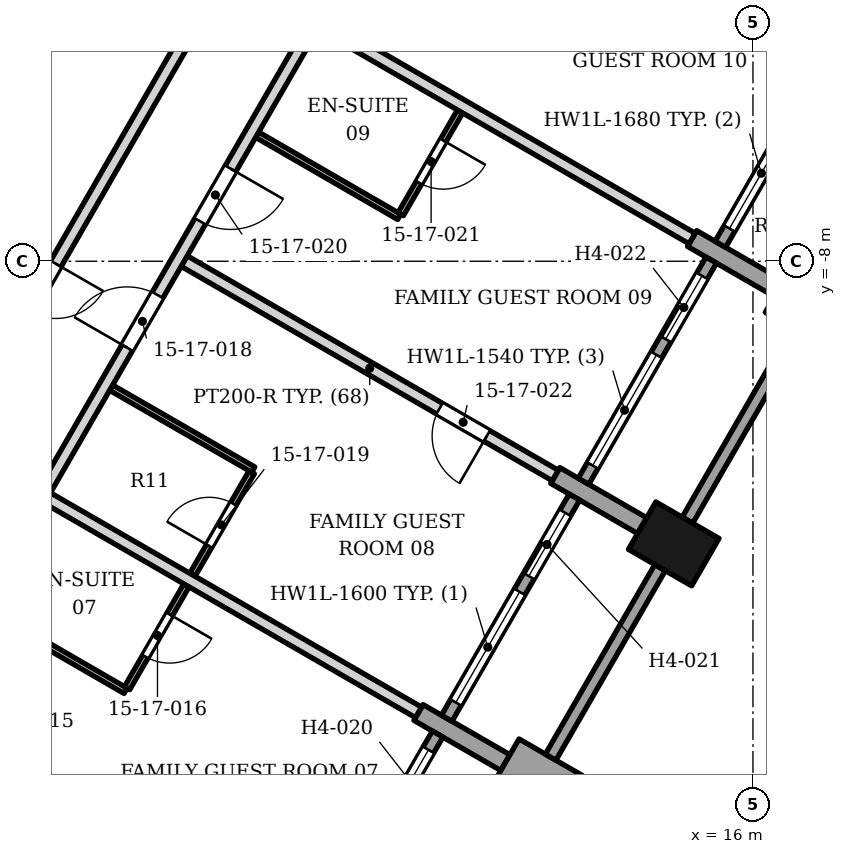
"""IFC4 building model, lengths in metres.
Left out: names, types, materials, properties, quantities, classifications, styles, units other than length and angle.
Written with IfcOpenShell. Run it as: python <this file> out.ifc"""

import sys

from ifc_helpers import new_model, si_unit, direction, frame, frame_2d, origin, origin_2d, place, context, subcontext, project, spatial, rectangle, extrude, element, fill, save


model = new_model("IFC4")
c1 = context("Model", 3, precision=1e-05, world=origin(), true_north=direction((0.0, 1.0)))
c2 = subcontext(c1, "Body", "Model", "MODEL_VIEW")
j1 = project(units=[si_unit("LENGTHUNIT", "METRE"), si_unit("PLANEANGLEUNIT", "RADIAN")], contexts=[c1])
p1 = place(None, origin())
s1 = spatial("IfcSite", under=j1, at=p1, CompositionType="ELEMENT")
p2 = place(p1, origin())
s2 = spatial("IfcBuilding", under=s1, at=p2, CompositionType="ELEMENT")
p3 = place(p2, frame((0.0, 0.0, 76.6)))
s3 = spatial("IfcBuildingStorey", under=s2, at=p3, CompositionType="ELEMENT", Elevation=76.6)
p4 = place(p3, frame((14.697, -12.648, 0.0), z_axis=(0.0, 0.0, 1.0), x_axis=(0.5, 0.866025403784, 0.0)))
e1 = element("IfcColumn", 1, at=p4, inside=s3, PredefinedType="COLUMN", context=c2, shape_type="SweptSolid", body=[
    extrude(rectangle(XDim=0.9, YDim=1.2, at=origin_2d()), origin(), (0.0, 0.0, 1.0), 3.4),
])
p5 = place(p3, frame((11.928, -16.245, 0.0), z_axis=(0.0, 0.0, 1.0), x_axis=(0.865955154139, -0.50012165622, 0.0)))
e2 = element("IfcWall", 2, at=p5, inside=s3, PredefinedType="SOLIDWALL", context=c2, shape_type="SweptSolid", body=[
    extrude(rectangle(XDim=1.2, YDim=0.9, at=frame_2d((0.6, 0.0))), origin(), (0.0, 0.0, 1.0), 2.63),
])
p6 = place(p3, frame((10.499, -15.42, 0.0), z_axis=(0.0, 0.0, 1.0), x_axis=(0.866040211805, -0.499974350878, 0.0)))
e3 = element("IfcWall", 3, at=p6, inside=s3, PredefinedType="SOLIDWALL", context=c2, shape_type="SweptSolid", body=[
    extrude(rectangle(XDim=1.65, YDim=0.3, at=frame_2d((0.825, 0.0))), origin(), (0.0, 0.0, 1.0), 2.65),
])
p7 = place(p3, frame((12.749, -11.523, 0.0), z_axis=(0.0, 0.0, 1.0), x_axis=(0.865993292597, -0.500055614084, 0.0)))
e4 = element("IfcWall", 4, at=p7, inside=s3, PredefinedType="SOLIDWALL", context=c2, shape_type="SweptSolid", body=[
    extrude(rectangle(XDim=1.649, YDim=0.3, at=frame_2d((0.825, 0.0))), origin(), (0.0, 0.0, 1.0), 2.242),
])
p8 = place(p3, frame((17.467, -9.051, 0.0), z_axis=(0.0, 0.0, 1.0), x_axis=(-0.865955154139, 0.50012165622, 0.0)))
e5 = element("IfcWall", 5, at=p8, inside=s3, PredefinedType="SOLIDWALL", context=c2, shape_type="SweptSolid", body=[
    extrude(rectangle(XDim=1.2, YDim=0.9, at=frame_2d((0.6, 0.0))), origin(), (0.0, 0.0, 1.0), 2.63),
])
p9 = place(p3, frame((16.428, -8.451, 0.0), z_axis=(0.0, 0.0, 1.0), x_axis=(-0.866040211805, 0.499974350878, 0.0)))
e6 = element("IfcWall", 6, at=p9, inside=s3, PredefinedType="SOLIDWALL", context=c2, shape_type="SweptSolid", body=[
    extrude(rectangle(XDim=1.65, YDim=0.3, at=frame_2d((0.825, 0.0))), origin(), (0.0, 0.0, 1.0), 2.384),
])
p10 = place(p3, frame((8.714, -19.413, 0.0), z_axis=(0.0, 0.0, 1.0), x_axis=(0.500027713859, 0.866009402589, 0.0)))
e7 = element("IfcWall", 7, at=p10, inside=s3, PredefinedType="ELEMENTEDWALL", context=c2, shape_type="SweptSolid", body=[
    extrude(rectangle(XDim=4.2, YDim=0.2, at=frame_2d((2.1, 0.0))), origin(), (0.0, 0.0, 1.0), 2.628),
])
p11 = place(p10, frame((0.3, 0.0, 0.6)))
e8 = element("IfcOpeningElement", 8, at=p11, cuts=e7, PredefinedType="OPENING", context=c2, shape_type="SweptSolid", body=[
    extrude(rectangle(XDim=2.1, YDim=1.8, at=frame_2d((1.05, 0.9))), frame((0.0, 0.11, 0.0), z_axis=(0.0, -1.0, 0.0), x_axis=(1.0, 0.0, 0.0)), (0.0, 0.0, 1.0), 0.22),
])
p12 = place(p10, frame((2.7, 0.0, 0.0)))
e9 = element("IfcOpeningElement", 9, at=p12, cuts=e7, PredefinedType="OPENING", context=c2, shape_type="SweptSolid", body=[
    extrude(rectangle(XDim=1.2, YDim=2.4, at=frame_2d((0.6, 1.2))), frame((0.0, 0.11, 0.0), z_axis=(0.0, -1.0, 0.0), x_axis=(1.0, 0.0, 0.0)), (0.0, 0.0, 1.0), 0.22),
])
p13 = place(p3, frame((12.672, -16.156, 0.0), z_axis=(0.0, 0.0, 1.0), x_axis=(0.500012057535, 0.866018442252, 0.0)))
e10 = element("IfcWall", 10, at=p13, inside=s3, PredefinedType="SOLIDWALL", context=c2, shape_type="SweptSolid", body=[
    extrude(rectangle(XDim=3.6, YDim=0.2, at=frame_2d((1.8, 0.0))), origin(), (0.0, 0.0, 1.0), 2.63),
])
p14 = place(p3, frame((10.964, -15.516, 0.0), z_axis=(0.0, 0.0, 1.0), x_axis=(0.500002543286, 0.866023935413, 0.0)))
e11 = element("IfcWall", 11, at=p14, inside=s3, PredefinedType="ELEMENTEDWALL", context=c2, shape_type="SweptSolid", body=[
    extrude(rectangle(XDim=4.2, YDim=0.2, at=frame_2d((2.1, 0.0))), origin(), (0.0, 0.0, 1.0), 2.302),
])
p15 = place(p14, frame((0.3, 0.0, 0.6)))
e12 = element("IfcOpeningElement", 12, at=p15, cuts=e11, PredefinedType="OPENING", context=c2, shape_type="SweptSolid", body=[
    extrude(rectangle(XDim=2.1, YDim=1.6, at=frame_2d((1.05, 0.8))), frame((0.0, 0.11, 0.0), z_axis=(0.0, -1.0, 0.0), x_axis=(1.0, 0.0, 0.0)), (0.0, 0.0, 1.0), 0.22),
])
p16 = place(p14, frame((2.7, 0.0, 0.0)))
e13 = element("IfcOpeningElement", 13, at=p16, cuts=e11, PredefinedType="OPENING", context=c2, shape_type="SweptSolid", body=[
    extrude(rectangle(XDim=1.2, YDim=2.2, at=frame_2d((0.6, 1.1))), frame((0.0, 0.11, 0.0), z_axis=(0.0, -1.0, 0.0), x_axis=(1.0, 0.0, 0.0)), (0.0, 0.0, 1.0), 0.22),
])
p17 = place(p3, frame((14.922, -12.259, 0.0), z_axis=(0.0, 0.0, 1.0), x_axis=(0.500012057535, 0.866018442252, 0.0)))
e14 = element("IfcWall", 14, at=p17, inside=s3, PredefinedType="SOLIDWALL", context=c2, shape_type="SweptSolid", body=[
    extrude(rectangle(XDim=3.6, YDim=0.2, at=frame_2d((1.8, 0.0))), origin(), (0.0, 0.0, 1.0), 2.302),
])
p18 = place(p3, frame((13.214, -11.618, 0.0), z_axis=(0.0, 0.0, 1.0), x_axis=(0.500027713859, 0.866009402589, 0.0)))
e15 = element("IfcWall", 15, at=p18, inside=s3, PredefinedType="ELEMENTEDWALL", context=c2, shape_type="SweptSolid", body=[
    extrude(rectangle(XDim=4.2, YDim=0.2, at=frame_2d((2.1, 0.0))), origin(), (0.0, 0.0, 1.0), 2.242),
])
p19 = place(p18, frame((0.3, 0.0, 0.6)))
e16 = element("IfcOpeningElement", 16, at=p19, cuts=e15, PredefinedType="OPENING", context=c2, shape_type="SweptSolid", body=[
    extrude(rectangle(XDim=2.1, YDim=1.54, at=frame_2d((1.05, 0.77))), frame((0.0, 0.11, 0.0), z_axis=(0.0, -1.0, 0.0), x_axis=(1.0, 0.0, 0.0)), (0.0, 0.0, 1.0), 0.22),
])
p20 = place(p18, frame((2.7, 0.0, 0.0)))
e17 = element("IfcOpeningElement", 17, at=p20, cuts=e15, PredefinedType="OPENING", context=c2, shape_type="SweptSolid", body=[
    extrude(rectangle(XDim=1.2, YDim=2.14, at=frame_2d((0.6, 1.07))), frame((0.0, 0.11, 0.0), z_axis=(0.0, -1.0, 0.0), x_axis=(1.0, 0.0, 0.0)), (0.0, 0.0, 1.0), 0.22),
])
p21 = place(p3, frame((15.464, -7.721, 0.0), z_axis=(0.0, 0.0, 1.0), x_axis=(0.500027713859, 0.866009402589, 0.0)))
e18 = element("IfcWall", 18, at=p21, inside=s3, PredefinedType="ELEMENTEDWALL", context=c2, shape_type="SweptSolid", body=[
    extrude(rectangle(XDim=4.2, YDim=0.2, at=frame_2d((2.1, 0.0))), origin(), (0.0, 0.0, 1.0), 2.384),
])
p22 = place(p21, frame((0.3, 0.0, 0.6)))
e19 = element("IfcOpeningElement", 19, at=p22, cuts=e18, PredefinedType="OPENING", context=c2, shape_type="SweptSolid", body=[
    extrude(rectangle(XDim=2.1, YDim=1.68, at=frame_2d((1.05, 0.84))), frame((0.0, 0.11, 0.0), z_axis=(0.0, -1.0, 0.0), x_axis=(1.0, 0.0, 0.0)), (0.0, 0.0, 1.0), 0.22),
])
p23 = place(p21, frame((2.7, 0.0, 0.0)))
e20 = element("IfcOpeningElement", 20, at=p23, cuts=e18, PredefinedType="OPENING", context=c2, shape_type="SweptSolid", body=[
    extrude(rectangle(XDim=1.2, YDim=2.28, at=frame_2d((0.6, 1.14))), frame((0.0, 0.11, 0.0), z_axis=(0.0, -1.0, 0.0), x_axis=(1.0, 0.0, 0.0)), (0.0, 0.0, 1.0), 0.22),
])
p24 = place(p3, frame((-0.029, -15.955, 0.0), z_axis=(0.0, 0.0, 1.0), x_axis=(0.499541892375, 0.866289730842, 0.0)))
e21 = element("IfcWall", 21, at=p24, inside=s3, PredefinedType="PARTITIONING", context=c2, shape_type="SweptSolid", body=[
    extrude(rectangle(XDim=13.93, YDim=0.2, at=frame_2d((6.965, 0.0))), origin(), (0.0, 0.0, 1.0), 2.242),
])
p25 = place(p24, frame((1.27, 0.0, 0.0)))
e22 = element("IfcOpeningElement", 22, at=p25, cuts=e21, PredefinedType="OPENING", context=c2, shape_type="SweptSolid", body=[
    extrude(rectangle(XDim=0.9, YDim=2.1, at=frame_2d((0.45, 1.05))), frame((0.0, 0.11, 0.0), z_axis=(0.0, -1.0, 0.0), x_axis=(1.0, 0.0, 0.0)), (0.0, 0.0, 1.0), 0.22),
])
p26 = place(p24, frame((8.235, 0.0, 0.0)))
e23 = element("IfcOpeningElement", 23, at=p26, cuts=e21, PredefinedType="OPENING", context=c2, shape_type="SweptSolid", body=[
    extrude(rectangle(XDim=0.9, YDim=2.1, at=frame_2d((0.45, 1.05))), frame((0.0, 0.11, 0.0), z_axis=(0.0, -1.0, 0.0), x_axis=(1.0, 0.0, 0.0)), (0.0, 0.0, 1.0), 0.22),
])
p27 = place(p3, frame((2.145, -15.791, 0.0), z_axis=(0.0, 0.0, 1.0), x_axis=(0.865906406618, -0.500206052519, 0.0)))
e24 = element("IfcWall", 24, at=p27, inside=s3, PredefinedType="PARTITIONING", context=c2, shape_type="SweptSolid", body=[
    extrude(rectangle(XDim=7.05, YDim=0.2, at=frame_2d((3.525, 0.0))), origin(), (0.0, 0.0, 1.0), 2.384),
])
p28 = place(p27, frame((4.85, 0.0, 0.0)))
e25 = element("IfcOpeningElement", 25, at=p28, cuts=e24, PredefinedType="OPENING", context=c2, shape_type="SweptSolid", body=[
    extrude(rectangle(XDim=0.9, YDim=2.1, at=frame_2d((0.45, 1.05))), frame((0.0, 0.11, 0.0), z_axis=(0.0, -1.0, 0.0), x_axis=(1.0, 0.0, 0.0)), (0.0, 0.0, 1.0), 0.22),
])
p29 = place(p3, frame((5.707, -15.021, 0.0), z_axis=(0.0, 0.0, 1.0), x_axis=(0.49995005938, 0.866054235095, 0.0)))
e26 = element("IfcWall", 26, at=p29, inside=s3, PredefinedType="PARTITIONING", context=c2, shape_type="SweptSolid", body=[
    extrude(rectangle(XDim=1.95, YDim=0.1, at=frame_2d((0.975, 0.0))), origin(), (0.0, 0.0, 1.0), 2.473),
])
p30 = place(p29, frame((0.6, 0.0, 0.0)))
e27 = element("IfcOpeningElement", 27, at=p30, cuts=e26, PredefinedType="OPENING", context=c2, shape_type="SweptSolid", body=[
    extrude(rectangle(XDim=0.8, YDim=2.1, at=frame_2d((0.4, 1.05))), frame((0.0, 0.06, 0.0), z_axis=(0.0, -1.0, 0.0), x_axis=(1.0, 0.0, 0.0)), (0.0, 0.0, 1.0), 0.12),
])
p31 = place(p3, frame((3.344, -13.713, 0.0), z_axis=(0.0, 0.0, 1.0), x_axis=(0.86571095196, -0.500544251447, 0.0)))
e28 = element("IfcWall", 28, at=p31, inside=s3, PredefinedType="PARTITIONING", context=c2, shape_type="SweptSolid", body=[
    extrude(rectangle(XDim=2.7, YDim=0.1, at=frame_2d((1.35, 0.0))), origin(), (0.0, 0.0, 1.0), 2.384),
])
p32 = place(p3, frame((6.781, -13.158, 0.0), z_axis=(0.0, 0.0, 1.0), x_axis=(0.50063639091, 0.865657671425, 0.0)))
e29 = element("IfcWall", 29, at=p32, inside=s3, PredefinedType="PARTITIONING", context=c2, shape_type="SweptSolid", body=[
    extrude(rectangle(XDim=1.95, YDim=0.1, at=frame_2d((0.975, 0.0))), origin(), (0.0, 0.0, 1.0), 2.242),
])
p33 = place(p32, frame((0.55, 0.0, 0.0)))
e30 = element("IfcOpeningElement", 30, at=p33, cuts=e29, PredefinedType="OPENING", context=c2, shape_type="SweptSolid", body=[
    extrude(rectangle(XDim=0.8, YDim=2.1, at=frame_2d((0.4, 1.05))), frame((0.0, 0.06, 0.0), z_axis=(0.0, -1.0, 0.0), x_axis=(1.0, 0.0, 0.0)), (0.0, 0.0, 1.0), 0.12),
])
p34 = place(p3, frame((4.395, -11.894, 0.0), z_axis=(0.0, 0.0, 1.0), x_axis=(0.866031034943, -0.499990246421, 0.0)))
e31 = element("IfcWall", 31, at=p34, inside=s3, PredefinedType="PARTITIONING", context=c2, shape_type="SweptSolid", body=[
    extrude(rectangle(XDim=7.05, YDim=0.2, at=frame_2d((3.525, 0.0))), origin(), (0.0, 0.0, 1.0), 2.302),
])
p35 = place(p3, frame((5.443, -10.078, 0.0), z_axis=(0.0, 0.0, 1.0), x_axis=(0.866339109022, -0.499456252518, 0.0)))
e32 = element("IfcWall", 32, at=p35, inside=s3, PredefinedType="PARTITIONING", context=c2, shape_type="SweptSolid", body=[
    extrude(rectangle(XDim=2.7, YDim=0.1, at=frame_2d((1.35, 0.0))), origin(), (0.0, 0.0, 1.0), 2.242),
])
p36 = place(p3, frame((6.645, -7.997, 0.0), z_axis=(0.0, 0.0, 1.0), x_axis=(0.865891406831, -0.500232017744, 0.0)))
e33 = element("IfcWall", 33, at=p36, inside=s3, PredefinedType="PARTITIONING", context=c2, shape_type="SweptSolid", body=[
    extrude(rectangle(XDim=7.05, YDim=0.2, at=frame_2d((3.525, 0.0))), origin(), (0.0, 0.0, 1.0), 2.242),
])
p37 = place(p36, frame((4.85, 0.0, 0.0)))
e34 = element("IfcOpeningElement", 34, at=p37, cuts=e33, PredefinedType="OPENING", context=c2, shape_type="SweptSolid", body=[
    extrude(rectangle(XDim=0.9, YDim=2.1, at=frame_2d((0.45, 1.05))), frame((0.0, 0.11, 0.0), z_axis=(0.0, -1.0, 0.0), x_axis=(1.0, 0.0, 0.0)), (0.0, 0.0, 1.0), 0.22),
])
p38 = place(p3, frame((10.207, -7.227, 0.0), z_axis=(0.0, 0.0, 1.0), x_axis=(0.49995005938, 0.866054235095, 0.0)))
e35 = element("IfcWall", 35, at=p38, inside=s3, PredefinedType="PARTITIONING", context=c2, shape_type="SweptSolid", body=[
    extrude(rectangle(XDim=1.95, YDim=0.1, at=frame_2d((0.975, 0.0))), origin(), (0.0, 0.0, 1.0), 2.242),
])
p39 = place(p38, frame((0.6, 0.0, 0.0)))
e36 = element("IfcOpeningElement", 36, at=p39, cuts=e35, PredefinedType="OPENING", context=c2, shape_type="SweptSolid", body=[
    extrude(rectangle(XDim=0.8, YDim=2.1, at=frame_2d((0.4, 1.05))), frame((0.0, 0.06, 0.0), z_axis=(0.0, -1.0, 0.0), x_axis=(1.0, 0.0, 0.0)), (0.0, 0.0, 1.0), 0.12),
])
p40 = place(p3, frame((7.844, -5.918, 0.0), z_axis=(0.0, 0.0, 1.0), x_axis=(0.865671764241, -0.500612022024, 0.0)))
e37 = element("IfcWall", 37, at=p40, inside=s3, PredefinedType="PARTITIONING", context=c2, shape_type="SweptSolid", body=[
    extrude(rectangle(XDim=2.7, YDim=0.1, at=frame_2d((1.35, 0.0))), origin(), (0.0, 0.0, 1.0), 2.473),
])
p41 = place(p3, frame((8.895, -4.1, 0.0), z_axis=(0.0, 0.0, 1.0), x_axis=(0.865906406618, -0.500206052519, 0.0)))
e38 = element("IfcWall", 38, at=p41, inside=s3, PredefinedType="PARTITIONING", context=c2, shape_type="SweptSolid", body=[
    extrude(rectangle(XDim=7.05, YDim=0.2, at=frame_2d((3.525, 0.0))), origin(), (0.0, 0.0, 1.0), 2.242),
])
p42 = place(p3, frame((0.859, -17.822, 0.0), z_axis=(0.0, 0.0, 1.0), x_axis=(0.500002395808, 0.866024020559, 0.0)))
e39 = element("IfcWall", 39, at=p42, inside=s3, PredefinedType="PARTITIONING", context=c2, shape_type="SweptSolid", body=[
    extrude(rectangle(XDim=23.0, YDim=0.2, at=frame_2d((11.5, 0.0))), origin(), (0.0, 0.0, 1.0), 2.242),
])
p43 = place(p42, frame((0.7, 0.0, 0.0)))
e40 = element("IfcOpeningElement", 40, at=p43, cuts=e39, PredefinedType="OPENING", context=c2, shape_type="SweptSolid", body=[
    extrude(rectangle(XDim=1.0, YDim=2.1, at=frame_2d((0.5, 1.05))), frame((0.0, 0.11, 0.0), z_axis=(0.0, -1.0, 0.0), x_axis=(1.0, 0.0, 0.0)), (0.0, 0.0, 1.0), 0.22),
])
p44 = place(p42, frame((3.1, 0.0, 0.0)))
e41 = element("IfcOpeningElement", 41, at=p44, cuts=e39, PredefinedType="OPENING", context=c2, shape_type="SweptSolid", body=[
    extrude(rectangle(XDim=1.0, YDim=2.1, at=frame_2d((0.5, 1.05))), frame((0.0, 0.11, 0.0), z_axis=(0.0, -1.0, 0.0), x_axis=(1.0, 0.0, 0.0)), (0.0, 0.0, 1.0), 0.22),
])
p45 = place(p42, frame((9.7, 0.0, 0.0)))
e42 = element("IfcOpeningElement", 42, at=p45, cuts=e39, PredefinedType="OPENING", context=c2, shape_type="SweptSolid", body=[
    extrude(rectangle(XDim=1.0, YDim=2.1, at=frame_2d((0.5, 1.05))), frame((0.0, 0.11, 0.0), z_axis=(0.0, -1.0, 0.0), x_axis=(1.0, 0.0, 0.0)), (0.0, 0.0, 1.0), 0.22),
])
p46 = place(p42, frame((12.1, 0.0, 0.0)))
e43 = element("IfcOpeningElement", 43, at=p46, cuts=e39, PredefinedType="OPENING", context=c2, shape_type="SweptSolid", body=[
    extrude(rectangle(XDim=1.0, YDim=2.1, at=frame_2d((0.5, 1.05))), frame((0.0, 0.11, 0.0), z_axis=(0.0, -1.0, 0.0), x_axis=(1.0, 0.0, 0.0)), (0.0, 0.0, 1.0), 0.22),
])
p47 = place(p42, frame((16.6, 0.0, 0.0)))
e44 = element("IfcOpeningElement", 44, at=p47, cuts=e39, PredefinedType="OPENING", context=c2, shape_type="SweptSolid", body=[
    extrude(rectangle(XDim=1.0, YDim=2.1, at=frame_2d((0.5, 1.05))), frame((0.0, 0.11, 0.0), z_axis=(0.0, -1.0, 0.0), x_axis=(1.0, 0.0, 0.0)), (0.0, 0.0, 1.0), 0.22),
])
p48 = place(p12, origin())
e45 = element("IfcDoor", 45, at=p48, inside=s3, OperationType="SINGLE_SWING_LEFT", PredefinedType="DOOR", context=c2, shape_type="SweptSolid", body=[
    extrude(rectangle(XDim=1.2, YDim=2.4, at=frame_2d((0.6, 1.2))), frame((0.0, 0.025, 0.0), z_axis=(0.0, -1.0, 0.0), x_axis=(1.0, 0.0, 0.0)), (0.0, 0.0, 1.0), 0.05),
])
fill(e9, e45)
p49 = place(p15, origin())
e46 = element("IfcWindow", 46, at=p49, inside=s3, PartitioningType="SINGLE_PANEL", PredefinedType="WINDOW", context=c2, shape_type="SweptSolid", body=[
    extrude(rectangle(XDim=2.1, YDim=1.6, at=frame_2d((1.05, 0.8))), frame((0.0, 0.03, 0.0), z_axis=(0.0, -1.0, 0.0), x_axis=(1.0, 0.0, 0.0)), (0.0, 0.0, 1.0), 0.06),
])
fill(e12, e46)
p50 = place(p16, origin())
e47 = element("IfcDoor", 47, at=p50, inside=s3, OperationType="SINGLE_SWING_LEFT", PredefinedType="DOOR", context=c2, shape_type="SweptSolid", body=[
    extrude(rectangle(XDim=1.2, YDim=2.2, at=frame_2d((0.6, 1.1))), frame((0.0, 0.025, 0.0), z_axis=(0.0, -1.0, 0.0), x_axis=(1.0, 0.0, 0.0)), (0.0, 0.0, 1.0), 0.05),
])
fill(e13, e47)
p51 = place(p19, origin())
e48 = element("IfcWindow", 48, at=p51, inside=s3, PartitioningType="SINGLE_PANEL", PredefinedType="WINDOW", context=c2, shape_type="SweptSolid", body=[
    extrude(rectangle(XDim=2.1, YDim=1.54, at=frame_2d((1.05, 0.77))), frame((0.0, 0.03, 0.0), z_axis=(0.0, -1.0, 0.0), x_axis=(1.0, 0.0, 0.0)), (0.0, 0.0, 1.0), 0.06),
])
fill(e16, e48)
p52 = place(p20, origin())
e49 = element("IfcDoor", 49, at=p52, inside=s3, OperationType="SINGLE_SWING_LEFT", PredefinedType="DOOR", context=c2, shape_type="SweptSolid", body=[
    extrude(rectangle(XDim=1.2, YDim=2.14, at=frame_2d((0.6, 1.07))), frame((0.0, 0.025, 0.0), z_axis=(0.0, -1.0, 0.0), x_axis=(1.0, 0.0, 0.0)), (0.0, 0.0, 1.0), 0.05),
])
fill(e17, e49)
p53 = place(p22, origin())
e50 = element("IfcWindow", 50, at=p53, inside=s3, PartitioningType="SINGLE_PANEL", PredefinedType="WINDOW", context=c2, shape_type="SweptSolid", body=[
    extrude(rectangle(XDim=2.1, YDim=1.68, at=frame_2d((1.05, 0.84))), frame((0.0, 0.03, 0.0), z_axis=(0.0, -1.0, 0.0), x_axis=(1.0, 0.0, 0.0)), (0.0, 0.0, 1.0), 0.06),
])
fill(e19, e50)
p54 = place(p30, origin())
e51 = element("IfcDoor", 51, at=p54, inside=s3, OperationType="SINGLE_SWING_RIGHT", PredefinedType="DOOR", context=c2, shape_type="SweptSolid", body=[
    extrude(rectangle(XDim=0.8, YDim=2.1, at=frame_2d((0.4, 1.05))), frame((0.0, 0.025, 0.0), z_axis=(0.0, -1.0, 0.0), x_axis=(1.0, 0.0, 0.0)), (0.0, 0.0, 1.0), 0.05),
])
fill(e27, e51)
p55 = place(p45, origin())
e52 = element("IfcDoor", 52, at=p55, inside=s3, OperationType="SINGLE_SWING_LEFT", PredefinedType="DOOR", context=c2, shape_type="SweptSolid", body=[
    extrude(rectangle(XDim=1.0, YDim=2.1, at=frame_2d((0.5, 1.05))), frame((0.0, 0.025, 0.0), z_axis=(0.0, -1.0, 0.0), x_axis=(1.0, 0.0, 0.0)), (0.0, 0.0, 1.0), 0.05),
])
fill(e42, e52)
p56 = place(p33, origin())
e53 = element("IfcDoor", 53, at=p56, inside=s3, OperationType="SINGLE_SWING_LEFT", PredefinedType="DOOR", context=c2, shape_type="SweptSolid", body=[
    extrude(rectangle(XDim=0.8, YDim=2.1, at=frame_2d((0.4, 1.05))), frame((0.0, 0.025, 0.0), z_axis=(0.0, -1.0, 0.0), x_axis=(1.0, 0.0, 0.0)), (0.0, 0.0, 1.0), 0.05),
])
fill(e30, e53)
p57 = place(p46, origin())
e54 = element("IfcDoor", 54, at=p57, inside=s3, OperationType="SINGLE_SWING_RIGHT", PredefinedType="DOOR", context=c2, shape_type="SweptSolid", body=[
    extrude(rectangle(XDim=1.0, YDim=2.1, at=frame_2d((0.5, 1.05))), frame((0.0, 0.025, 0.0), z_axis=(0.0, -1.0, 0.0), x_axis=(1.0, 0.0, 0.0)), (0.0, 0.0, 1.0), 0.05),
])
fill(e43, e54)
p58 = place(p39, origin())
e55 = element("IfcDoor", 55, at=p58, inside=s3, OperationType="SINGLE_SWING_RIGHT", PredefinedType="DOOR", context=c2, shape_type="SweptSolid", body=[
    extrude(rectangle(XDim=0.8, YDim=2.1, at=frame_2d((0.4, 1.05))), frame((0.0, 0.025, 0.0), z_axis=(0.0, -1.0, 0.0), x_axis=(1.0, 0.0, 0.0)), (0.0, 0.0, 1.0), 0.05),
])
fill(e36, e55)
p59 = place(p37, origin())
e56 = element("IfcDoor", 56, at=p59, inside=s3, OperationType="SINGLE_SWING_RIGHT", PredefinedType="DOOR", context=c2, shape_type="SweptSolid", body=[
    extrude(rectangle(XDim=0.9, YDim=2.1, at=frame_2d((0.45, 1.05))), frame((0.0, 0.025, 0.0), z_axis=(0.0, -1.0, 0.0), x_axis=(1.0, 0.0, 0.0)), (0.0, 0.0, 1.0), 0.05),
])
fill(e34, e56)
p60 = place(p26, origin())
e57 = element("IfcDoor", 57, at=p60, inside=s3, OperationType="SINGLE_SWING_RIGHT", PredefinedType="DOOR", context=c2, shape_type="SweptSolid", body=[
    extrude(rectangle(XDim=0.9, YDim=2.1, at=frame_2d((0.45, 1.05))), frame((0.0, 0.025, 0.0), z_axis=(0.0, -1.0, 0.0), x_axis=(1.0, 0.0, 0.0)), (0.0, 0.0, 1.0), 0.05),
])
fill(e23, e57)
save(model, sys.argv[1])
